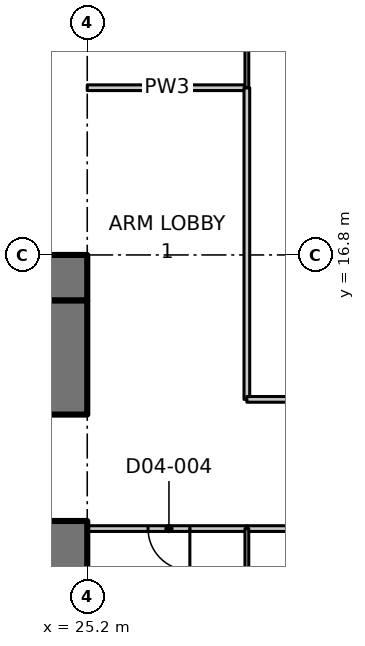
"""IFC4 building model, lengths in metres.
Left out: names, types, materials, properties, quantities, classifications, styles, units other than length and angle.
Written with IfcOpenShell. Run it as: python <this file> out.ifc"""

import sys

from ifc_helpers import new_model, si_unit, direction, frame, frame_2d, origin, place, context, subcontext, project, spatial, polyline, rectangle, outline, extrude, element, fill, save


model = new_model("IFC4")
c1 = context("Model", 3, precision=1e-05, world=origin(), true_north=direction((0.0, 1.0)))
c2 = subcontext(c1, "Body", "Model", "MODEL_VIEW")
j1 = project(units=[si_unit("LENGTHUNIT", "METRE"), si_unit("PLANEANGLEUNIT", "RADIAN")], contexts=[c1])
p1 = place(None, origin())
s1 = spatial("IfcSite", under=j1, at=p1, CompositionType="ELEMENT")
p2 = place(p1, origin())
s2 = spatial("IfcBuilding", under=s1, at=p2, CompositionType="ELEMENT")
p3 = place(p2, frame((0.0, 0.0, 20.0)))
s3 = spatial("IfcBuildingStorey", under=s2, at=p3, CompositionType="ELEMENT", Elevation=20.0)
p4 = place(p3, frame((23.8, 16.2, 0.0), z_axis=(0.0, 0.0, 1.0), x_axis=(1.0, 0.0, 0.0)))
e1 = element("IfcWall", 1, at=p4, inside=s3, PredefinedType="SHEAR", context=c2, shape_type="SweptSolid", body=[
    extrude(rectangle(XDim=1.4, YDim=1.2, at=frame_2d((0.7, 0.0))), origin(), (0.0, 0.0, 1.0), 7.25),
])
p5 = place(p3, frame((24.6, 1.2, 0.0), z_axis=(0.0, 0.0, 1.0), x_axis=(0.0, 1.0, 0.0)))
e2 = element("IfcWall", 2, at=p5, inside=s3, PredefinedType="SHEAR", context=c2, shape_type="SweptSolid", body=[
    extrude(rectangle(XDim=8.6, YDim=1.2, at=frame_2d((4.3, 0.0))), origin(), (0.0, 0.0, 1.0), 7.25),
])
p6 = place(p3, frame((24.6, 12.6, 0.0), z_axis=(0.0, 0.0, 1.0), x_axis=(0.0, 1.0, 0.0)))
e3 = element("IfcWall", 3, at=p6, inside=s3, PredefinedType="SHEAR", context=c2, shape_type="SweptSolid", body=[
    extrude(rectangle(XDim=3.0, YDim=1.2, at=frame_2d((1.5, 0.0))), origin(), (0.0, 0.0, 1.0), 7.25),
])
p7 = place(p3, frame((25.2, 21.2, 0.0), z_axis=(0.0, 0.0, 1.0), x_axis=(1.0, 0.0, 0.0)))
e4 = element("IfcWall", 4, at=p7, inside=s3, PredefinedType="PARTITIONING", context=c2, shape_type="SweptSolid", body=[
    extrude(rectangle(XDim=4.2, YDim=0.15, at=frame_2d((2.1, 0.0))), origin(), (0.0, 0.0, 1.0), 7.23),
])
p8 = place(p3, frame((29.4, 9.6, 0.0), z_axis=(0.0, 0.0, 1.0), x_axis=(-1.0, 0.0, 0.0)))
e5 = element("IfcWall", 5, at=p8, inside=s3, PredefinedType="PARTITIONING", context=c2, shape_type="SweptSolid", body=[
    extrude(rectangle(XDim=4.2, YDim=0.15, at=frame_2d((2.1, 0.0))), origin(), (0.0, 0.0, 1.0), 7.23),
])
p9 = place(p8, frame((1.5, 0.0, 0.0)))
e6 = element("IfcOpeningElement", 6, at=p9, cuts=e5, PredefinedType="OPENING", context=c2, shape_type="SweptSolid", body=[
    extrude(rectangle(XDim=1.1, YDim=2.1, at=frame_2d((0.55, 1.05))), frame((0.0, 0.085, 0.0), z_axis=(0.0, -1.0, 0.0), x_axis=(1.0, 0.0, 0.0)), (0.0, 0.0, 1.0), 0.17),
])
p10 = place(p3, frame((29.4, 21.2, 0.0), z_axis=(0.0, 0.0, 1.0), x_axis=(0.0, -1.0, 0.0)))
e7 = element("IfcWall", 7, at=p10, inside=s3, PredefinedType="PARTITIONING", context=c2, shape_type="SweptSolid", body=[
    extrude(rectangle(XDim=8.2, YDim=0.15, at=frame_2d((4.1, 0.0))), origin(), (0.0, 0.0, 1.0), 7.23),
])
p11 = place(p3, frame((29.4, 26.776, 0.0), z_axis=(0.0, 0.0, 1.0), x_axis=(0.0, -1.0, 0.0)))
e8 = element("IfcWall", 8, at=p11, inside=s3, PredefinedType="PARTITIONING", context=c2, shape_type="SweptSolid", body=[
    extrude(outline(polyline([(0.0, 0.0), (5.576, 0.0), (5.576, 7.23), (2.026, 7.23), (2.024, 6.88), (1.128, 6.88), (1.126, 7.23), (0.0, 7.23), (0.0, 0.0)])), frame((0.0, 0.05, 0.0), z_axis=(0.0, -1.0, 0.0), x_axis=(1.0, 0.0, 0.0)), (0.0, 0.0, 1.0), 0.1),
])
p12 = place(p3, frame((33.6, 9.6, 0.0), z_axis=(0.0, 0.0, 1.0), x_axis=(-1.0, 0.0, 0.0)))
e9 = element("IfcWall", 9, at=p12, inside=s3, PredefinedType="PARTITIONING", context=c2, shape_type="SweptSolid", body=[
    extrude(rectangle(XDim=4.2, YDim=0.15, at=frame_2d((2.1, 0.0))), origin(), (0.0, 0.0, 1.0), 7.23),
])
p13 = place(p12, frame((1.5, 0.0, 0.0)))
e10 = element("IfcOpeningElement", 10, at=p13, cuts=e9, PredefinedType="OPENING", context=c2, shape_type="SweptSolid", body=[
    extrude(rectangle(XDim=1.1, YDim=2.1, at=frame_2d((0.55, 1.05))), frame((0.0, 0.085, 0.0), z_axis=(0.0, -1.0, 0.0), x_axis=(1.0, 0.0, 0.0)), (0.0, 0.0, 1.0), 0.17),
])
p14 = place(p3, frame((29.4, 13.0, 0.0), z_axis=(0.0, 0.0, 1.0), x_axis=(1.0, 0.0, 0.0)))
e11 = element("IfcWall", 11, at=p14, inside=s3, PredefinedType="PARTITIONING", context=c2, shape_type="SweptSolid", body=[
    extrude(rectangle(XDim=8.4, YDim=0.15, at=frame_2d((4.2, 0.0))), origin(), (0.0, 0.0, 1.0), 7.23),
])
p15 = place(p14, frame((3.3, 0.0, 0.0)))
e12 = element("IfcOpeningElement", 12, at=p15, cuts=e11, PredefinedType="OPENING", context=c2, shape_type="SweptSolid", body=[
    extrude(rectangle(XDim=1.8, YDim=2.1, at=frame_2d((0.9, 1.05))), frame((0.0, 0.085, 0.0), z_axis=(0.0, -1.0, 0.0), x_axis=(1.0, 0.0, 0.0)), (0.0, 0.0, 1.0), 0.17),
])
p16 = place(p3, frame((29.4, 9.6, 0.0), z_axis=(0.0, 0.0, 1.0), x_axis=(0.0, -1.0, 0.0)))
e13 = element("IfcWall", 13, at=p16, inside=s3, PredefinedType="PARTITIONING", context=c2, shape_type="SweptSolid", body=[
    extrude(outline(polyline([(0.0, 0.0), (10.398, 0.0), (10.398, 7.23), (10.05, 7.23), (10.048, 6.88), (9.152, 6.88), (9.15, 7.23), (0.0, 7.23), (0.0, 0.0)])), frame((0.0, 0.05, 0.0), z_axis=(0.0, -1.0, 0.0), x_axis=(1.0, 0.0, 0.0)), (0.0, 0.0, 1.0), 0.1),
])
p17 = place(p9, origin())
e14 = element("IfcDoor", 14, at=p17, inside=s3, OperationType="SINGLE_SWING_LEFT", PredefinedType="DOOR", context=c2, shape_type="SweptSolid", body=[
    extrude(rectangle(XDim=1.1, YDim=2.1, at=frame_2d((0.55, 1.05))), frame((0.0, 0.025, 0.0), z_axis=(0.0, -1.0, 0.0), x_axis=(1.0, 0.0, 0.0)), (0.0, 0.0, 1.0), 0.05),
])
fill(e6, e14)
save(model, sys.argv[1])
